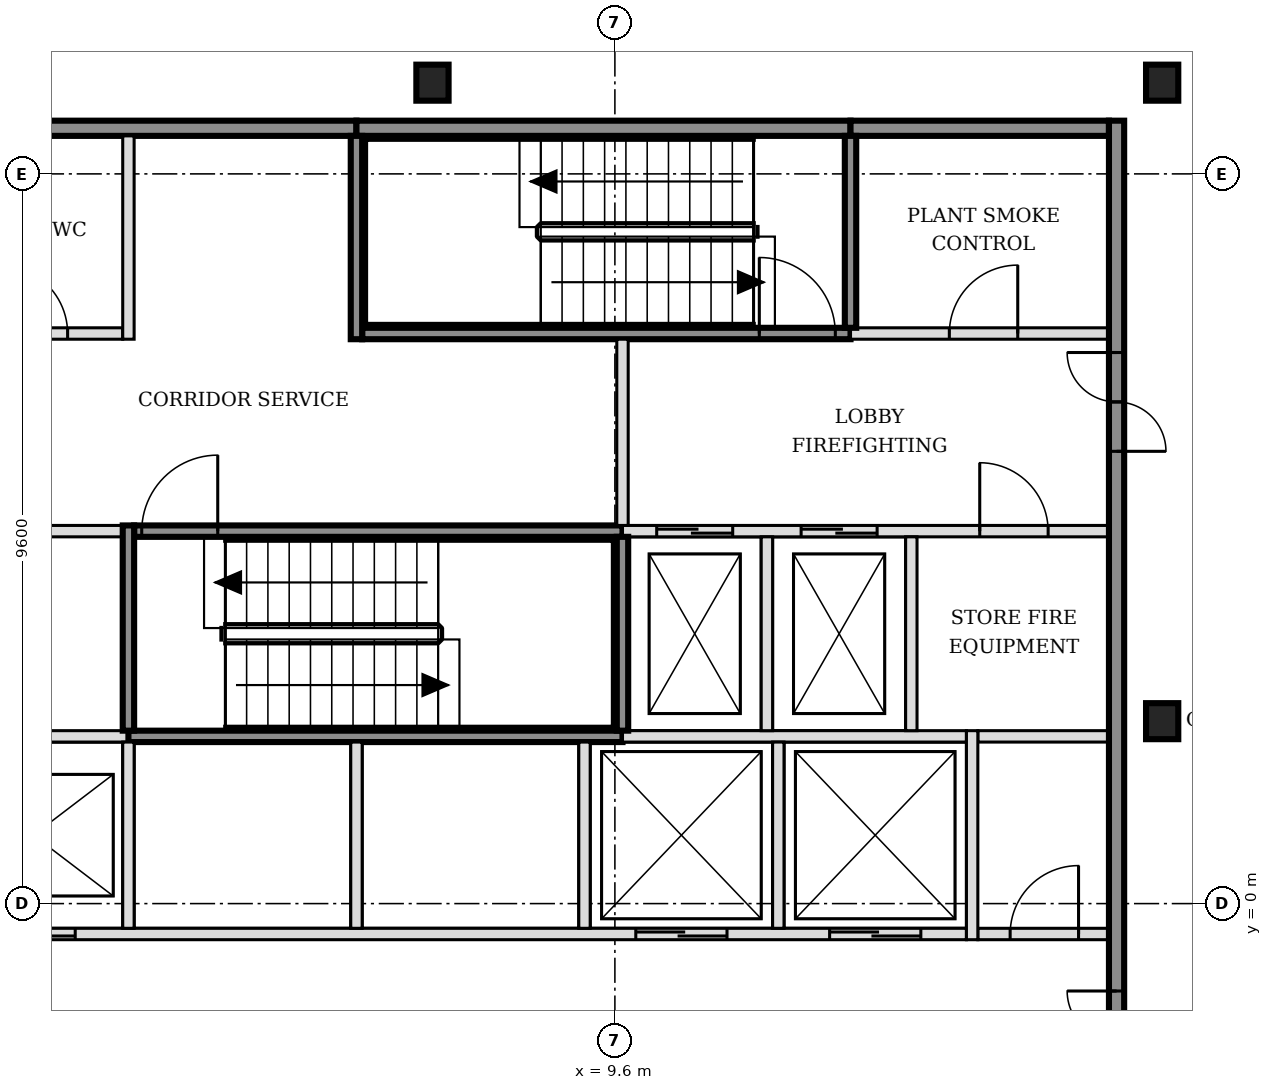
"""IFC4 building model, lengths in metres.
Left out: names, types, materials, properties, quantities, classifications, styles, units other than length and angle.
Written with IfcOpenShell. Run it as: python <this file> out.ifc"""

import sys

from ifc_helpers import new_model, si_unit, direction, frame, frame_2d, origin, origin_2d, place, context, subcontext, project, spatial, rectangle, i_section, extrude, element, fill, save


model = new_model("IFC4")
c1 = context("Model", 3, precision=1e-05, world=origin(), true_north=direction((0.0, 1.0)))
c2 = subcontext(c1, "Body", "Model", "MODEL_VIEW")
j1 = project(units=[si_unit("LENGTHUNIT", "METRE"), si_unit("PLANEANGLEUNIT", "RADIAN")], contexts=[c1])
p1 = place(None, origin())
s1 = spatial("IfcSite", under=j1, at=p1, CompositionType="ELEMENT")
p2 = place(p1, origin())
s2 = spatial("IfcBuilding", under=s1, at=p2, CompositionType="ELEMENT")
p3 = place(p2, frame((0.0, 0.0, 115.8)))
s3 = spatial("IfcBuildingStorey", under=s2, at=p3, CompositionType="ELEMENT", Elevation=115.8)
for number, where, z_axis, x_axis in (
    (1, (16.8, 2.4, -0.15), (0.0, 0.0, 1.0), (1.0, 0.0, 0.0)),
    (2, (7.2, 10.8, -0.15), (0.0, 0.0, 1.0), (1.0, 0.0, 0.0)),
    (3, (16.8, 10.8, -0.15), (0.0, 0.0, 1.0), (1.0, 0.0, 0.0)),
):
    element("IfcColumn", number, at=place(p3, frame(where, z_axis=z_axis, x_axis=x_axis)), inside=s3, PredefinedType="COLUMN", context=c2, shape_type="SweptSolid", body=[
        extrude(i_section(OverallWidth=0.424, OverallDepth=0.474, WebThickness=0.048, FlangeThickness=0.077, FilletRadius=0.015, at=origin_2d()), origin(), (0.0, 0.0, 1.0), 3.5),
    ])
p4 = place(p3, frame((-1.7, -0.4, 0.0), z_axis=(0.0, 0.0, 1.0), x_axis=(1.0, 0.0, 0.0)))
e4 = element("IfcWall", 4, at=p4, inside=s3, PredefinedType="SOLIDWALL", context=c2, shape_type="SweptSolid", body=[
    extrude(rectangle(XDim=15.925, YDim=0.15, at=frame_2d((7.962, 0.0))), origin(), (0.0, 0.0, 1.0), 3.35),
])
p5 = place(p4, frame((0.6, 0.0, 0.0)))
e5 = element("IfcOpeningElement", 5, at=p5, cuts=e4, PredefinedType="OPENING", context=c2, shape_type="SweptSolid", body=[
    extrude(rectangle(XDim=1.1, YDim=2.1, at=frame_2d((0.55, 1.05))), frame((0.0, 0.085, 0.0), z_axis=(0.0, -1.0, 0.0), x_axis=(1.0, 0.0, 0.0)), (0.0, 0.0, 1.0), 0.17),
])
p6 = place(p4, frame((3.1, 0.0, 0.0)))
e6 = element("IfcOpeningElement", 6, at=p6, cuts=e4, PredefinedType="OPENING", context=c2, shape_type="SweptSolid", body=[
    extrude(rectangle(XDim=1.1, YDim=2.1, at=frame_2d((0.55, 1.05))), frame((0.0, 0.085, 0.0), z_axis=(0.0, -1.0, 0.0), x_axis=(1.0, 0.0, 0.0)), (0.0, 0.0, 1.0), 0.17),
])
p7 = place(p4, frame((11.575, 0.0, 0.0)))
e7 = element("IfcOpeningElement", 7, at=p7, cuts=e4, PredefinedType="OPENING", context=c2, shape_type="SweptSolid", body=[
    extrude(rectangle(XDim=1.2, YDim=2.1, at=frame_2d((0.6, 1.05))), frame((0.0, 0.085, 0.0), z_axis=(0.0, -1.0, 0.0), x_axis=(1.0, 0.0, 0.0)), (0.0, 0.0, 1.0), 0.17),
])
p8 = place(p4, frame((14.125, 0.0, 0.0)))
e8 = element("IfcOpeningElement", 8, at=p8, cuts=e4, PredefinedType="OPENING", context=c2, shape_type="SweptSolid", body=[
    extrude(rectangle(XDim=1.2, YDim=2.1, at=frame_2d((0.6, 1.05))), frame((0.0, 0.085, 0.0), z_axis=(0.0, -1.0, 0.0), x_axis=(1.0, 0.0, 0.0)), (0.0, 0.0, 1.0), 0.17),
])
p9 = place(p3, frame((14.375, -0.4, 0.0), z_axis=(0.0, 0.0, 1.0), x_axis=(1.0, 0.0, 0.0)))
e9 = element("IfcWall", 9, at=p9, inside=s3, PredefinedType="PARTITIONING", context=c2, shape_type="SweptSolid", body=[
    extrude(rectangle(XDim=1.725, YDim=0.15, at=frame_2d((0.863, 0.0))), origin(), (0.0, 0.0, 1.0), 3.35),
])
p10 = place(p9, frame((0.425, 0.0, 0.0)))
e10 = element("IfcOpeningElement", 10, at=p10, cuts=e9, PredefinedType="OPENING", context=c2, shape_type="SweptSolid", body=[
    extrude(rectangle(XDim=0.9, YDim=2.1, at=frame_2d((0.45, 1.05))), frame((0.0, 0.085, 0.0), z_axis=(0.0, -1.0, 0.0), x_axis=(1.0, 0.0, 0.0)), (0.0, 0.0, 1.0), 0.17),
])
p11 = place(p3, frame((-1.7, 2.2, 0.0), z_axis=(0.0, 0.0, 1.0), x_axis=(1.0, 0.0, 0.0)))
e11 = element("IfcWall", 11, at=p11, inside=s3, PredefinedType="SOLIDWALL", context=c2, shape_type="SweptSolid", body=[
    extrude(rectangle(XDim=4.9, YDim=0.15, at=frame_2d((2.45, 0.0))), origin(), (0.0, 0.0, 1.0), 3.35),
])
p12 = place(p3, frame((3.2, 2.2, 0.0), z_axis=(0.0, 0.0, 1.0), x_axis=(1.0, 0.0, 0.0)))
e12 = element("IfcWall", 12, at=p12, inside=s3, PredefinedType="SOLIDWALL", context=c2, shape_type="SweptSolid", body=[
    extrude(rectangle(XDim=6.5, YDim=0.15, at=frame_2d((3.25, 0.0))), origin(), (0.0, 0.0, 1.0), 3.35),
])
p13 = place(p3, frame((9.7, 2.2, 0.0), z_axis=(0.0, 0.0, 1.0), x_axis=(1.0, 0.0, 0.0)))
e13 = element("IfcWall", 13, at=p13, inside=s3, PredefinedType="SOLIDWALL", context=c2, shape_type="SweptSolid", body=[
    extrude(rectangle(XDim=4.525, YDim=0.15, at=frame_2d((2.263, 0.0))), origin(), (0.0, 0.0, 1.0), 3.35),
])
p14 = place(p3, frame((14.375, 2.2, 0.0), z_axis=(0.0, 0.0, 1.0), x_axis=(1.0, 0.0, 0.0)))
e14 = element("IfcWall", 14, at=p14, inside=s3, PredefinedType="PARTITIONING", context=c2, shape_type="SweptSolid", body=[
    extrude(rectangle(XDim=1.725, YDim=0.15, at=frame_2d((0.863, 0.0))), origin(), (0.0, 0.0, 1.0), 3.35),
])
p15 = place(p3, frame((-1.7, 4.9, 0.0), z_axis=(0.0, 0.0, 1.0), x_axis=(1.0, 0.0, 0.0)))
e15 = element("IfcWall", 15, at=p15, inside=s3, PredefinedType="PARTITIONING", context=c2, shape_type="SweptSolid", body=[
    extrude(rectangle(XDim=4.825, YDim=0.15, at=frame_2d((2.413, 0.0))), origin(), (0.0, 0.0, 1.0), 3.35),
])
p16 = place(p15, frame((1.95, 0.0, 0.0)))
e16 = element("IfcOpeningElement", 16, at=p16, cuts=e15, PredefinedType="OPENING", context=c2, shape_type="SweptSolid", body=[
    extrude(rectangle(XDim=0.9, YDim=2.1, at=frame_2d((0.45, 1.05))), frame((0.0, 0.085, 0.0), z_axis=(0.0, -1.0, 0.0), x_axis=(1.0, 0.0, 0.0)), (0.0, 0.0, 1.0), 0.17),
])
p17 = place(p3, frame((3.275, 4.9, 0.0), z_axis=(0.0, 0.0, 1.0), x_axis=(1.0, 0.0, 0.0)))
e17 = element("IfcWall", 17, at=p17, inside=s3, PredefinedType="SOLIDWALL", context=c2, shape_type="SweptSolid", body=[
    extrude(rectangle(XDim=6.425, YDim=0.15, at=frame_2d((3.212, 0.0))), origin(), (0.0, 0.0, 1.0), 3.35),
])
p18 = place(p17, frame((0.1, 0.0, 0.0)))
e18 = element("IfcOpeningElement", 18, at=p18, cuts=e17, PredefinedType="OPENING", context=c2, shape_type="SweptSolid", body=[
    extrude(rectangle(XDim=1.0, YDim=2.1, at=frame_2d((0.5, 1.05))), frame((0.0, 0.085, 0.0), z_axis=(0.0, -1.0, 0.0), x_axis=(1.0, 0.0, 0.0)), (0.0, 0.0, 1.0), 0.17),
])
p19 = place(p3, frame((9.7, 4.9, 0.0), z_axis=(0.0, 0.0, 1.0), x_axis=(1.0, 0.0, 0.0)))
e19 = element("IfcWall", 19, at=p19, inside=s3, PredefinedType="SOLIDWALL", context=c2, shape_type="SweptSolid", body=[
    extrude(rectangle(XDim=6.4, YDim=0.15, at=frame_2d((3.2, 0.0))), origin(), (0.0, 0.0, 1.0), 3.35),
])
p20 = place(p19, frame((0.45, 0.0, 0.0)))
e20 = element("IfcOpeningElement", 20, at=p20, cuts=e19, PredefinedType="OPENING", context=c2, shape_type="SweptSolid", body=[
    extrude(rectangle(XDim=1.0, YDim=2.1, at=frame_2d((0.5, 1.05))), frame((0.0, 0.085, 0.0), z_axis=(0.0, -1.0, 0.0), x_axis=(1.0, 0.0, 0.0)), (0.0, 0.0, 1.0), 0.17),
])
p21 = place(p19, frame((2.35, 0.0, 0.0)))
e21 = element("IfcOpeningElement", 21, at=p21, cuts=e19, PredefinedType="OPENING", context=c2, shape_type="SweptSolid", body=[
    extrude(rectangle(XDim=1.0, YDim=2.1, at=frame_2d((0.5, 1.05))), frame((0.0, 0.085, 0.0), z_axis=(0.0, -1.0, 0.0), x_axis=(1.0, 0.0, 0.0)), (0.0, 0.0, 1.0), 0.17),
])
p22 = place(p19, frame((4.7, 0.0, 0.0)))
e22 = element("IfcOpeningElement", 22, at=p22, cuts=e19, PredefinedType="OPENING", context=c2, shape_type="SweptSolid", body=[
    extrude(rectangle(XDim=0.9, YDim=2.1, at=frame_2d((0.45, 1.05))), frame((0.0, 0.085, 0.0), z_axis=(0.0, -1.0, 0.0), x_axis=(1.0, 0.0, 0.0)), (0.0, 0.0, 1.0), 0.17),
])
p23 = place(p3, frame((-1.7, 7.5, 0.0), z_axis=(0.0, 0.0, 1.0), x_axis=(1.0, 0.0, 0.0)))
e23 = element("IfcWall", 23, at=p23, inside=s3, PredefinedType="PARTITIONING", context=c2, shape_type="SweptSolid", body=[
    extrude(rectangle(XDim=4.825, YDim=0.15, at=frame_2d((2.413, 0.0))), origin(), (0.0, 0.0, 1.0), 3.35),
])
p24 = place(p23, frame((0.7, 0.0, 0.0)))
e24 = element("IfcOpeningElement", 24, at=p24, cuts=e23, PredefinedType="OPENING", context=c2, shape_type="SweptSolid", body=[
    extrude(rectangle(XDim=0.9, YDim=2.1, at=frame_2d((0.45, 1.05))), frame((0.0, 0.085, 0.0), z_axis=(0.0, -1.0, 0.0), x_axis=(1.0, 0.0, 0.0)), (0.0, 0.0, 1.0), 0.17),
])
p25 = place(p23, frame((3.2, 0.0, 0.0)))
e25 = element("IfcOpeningElement", 25, at=p25, cuts=e23, PredefinedType="OPENING", context=c2, shape_type="SweptSolid", body=[
    extrude(rectangle(XDim=0.9, YDim=2.1, at=frame_2d((0.45, 1.05))), frame((0.0, 0.085, 0.0), z_axis=(0.0, -1.0, 0.0), x_axis=(1.0, 0.0, 0.0)), (0.0, 0.0, 1.0), 0.17),
])
p26 = place(p3, frame((6.275, 7.5, 0.0), z_axis=(0.0, 0.0, 1.0), x_axis=(1.0, 0.0, 0.0)))
e26 = element("IfcWall", 26, at=p26, inside=s3, PredefinedType="SOLIDWALL", context=c2, shape_type="SweptSolid", body=[
    extrude(rectangle(XDim=6.425, YDim=0.15, at=frame_2d((3.212, 0.0))), origin(), (0.0, 0.0, 1.0), 3.35),
])
p27 = place(p26, frame((5.225, 0.0, 0.0)))
e27 = element("IfcOpeningElement", 27, at=p27, cuts=e26, PredefinedType="OPENING", context=c2, shape_type="SweptSolid", body=[
    extrude(rectangle(XDim=1.0, YDim=2.1, at=frame_2d((0.5, 1.05))), frame((0.0, 0.085, 0.0), z_axis=(0.0, -1.0, 0.0), x_axis=(1.0, 0.0, 0.0)), (0.0, 0.0, 1.0), 0.17),
])
p28 = place(p3, frame((12.7, 7.5, 0.0), z_axis=(0.0, 0.0, 1.0), x_axis=(1.0, 0.0, 0.0)))
e28 = element("IfcWall", 28, at=p28, inside=s3, PredefinedType="SOLIDWALL", context=c2, shape_type="SweptSolid", body=[
    extrude(rectangle(XDim=3.4, YDim=0.15, at=frame_2d((1.7, 0.0))), origin(), (0.0, 0.0, 1.0), 3.35),
])
p29 = place(p28, frame((1.3, 0.0, 0.0)))
e29 = element("IfcOpeningElement", 29, at=p29, cuts=e28, PredefinedType="OPENING", context=c2, shape_type="SweptSolid", body=[
    extrude(rectangle(XDim=0.9, YDim=2.1, at=frame_2d((0.45, 1.05))), frame((0.0, 0.085, 0.0), z_axis=(0.0, -1.0, 0.0), x_axis=(1.0, 0.0, 0.0)), (0.0, 0.0, 1.0), 0.17),
])
p30 = place(p3, frame((-1.7, 10.2, 0.0), z_axis=(0.0, 0.0, 1.0), x_axis=(1.0, 0.0, 0.0)))
e30 = element("IfcWall", 30, at=p30, inside=s3, PredefinedType="SOLIDWALL", context=c2, shape_type="SweptSolid", body=[
    extrude(rectangle(XDim=7.9, YDim=0.2, at=frame_2d((3.95, 0.0))), origin(), (0.0, 0.0, 1.0), 3.35),
])
p31 = place(p3, frame((6.2, 10.2, 0.0), z_axis=(0.0, 0.0, 1.0), x_axis=(1.0, 0.0, 0.0)))
e31 = element("IfcWall", 31, at=p31, inside=s3, PredefinedType="SOLIDWALL", context=c2, shape_type="SweptSolid", body=[
    extrude(rectangle(XDim=6.5, YDim=0.2, at=frame_2d((3.25, 0.0))), origin(), (0.0, 0.0, 1.0), 3.35),
])
p32 = place(p3, frame((12.7, 10.2, 0.0), z_axis=(0.0, 0.0, 1.0), x_axis=(1.0, 0.0, 0.0)))
e32 = element("IfcWall", 32, at=p32, inside=s3, PredefinedType="SOLIDWALL", context=c2, shape_type="SweptSolid", body=[
    extrude(rectangle(XDim=3.4, YDim=0.2, at=frame_2d((1.7, 0.0))), origin(), (0.0, 0.0, 1.0), 3.35),
])
p33 = place(p3, frame((3.2, -0.325, 0.0), z_axis=(0.0, 0.0, 1.0), x_axis=(0.0, 1.0, 0.0)))
e33 = element("IfcWall", 33, at=p33, inside=s3, PredefinedType="SOLIDWALL", context=c2, shape_type="SweptSolid", body=[
    extrude(rectangle(XDim=2.45, YDim=0.15, at=frame_2d((1.225, 0.0))), origin(), (0.0, 0.0, 1.0), 3.35),
])
p34 = place(p3, frame((3.2, 2.275, 0.0), z_axis=(0.0, 0.0, 1.0), x_axis=(0.0, 1.0, 0.0)))
e34 = element("IfcWall", 34, at=p34, inside=s3, PredefinedType="SOLIDWALL", context=c2, shape_type="SweptSolid", body=[
    extrude(rectangle(XDim=2.7, YDim=0.15, at=frame_2d((1.35, 0.0))), origin(), (0.0, 0.0, 1.0), 3.35),
])
p35 = place(p3, frame((3.2, 7.425, 0.0), z_axis=(0.0, 0.0, 1.0), x_axis=(0.0, 1.0, 0.0)))
e35 = element("IfcWall", 35, at=p35, inside=s3, PredefinedType="PARTITIONING", context=c2, shape_type="SweptSolid", body=[
    extrude(rectangle(XDim=2.675, YDim=0.15, at=frame_2d((1.337, 0.0))), origin(), (0.0, 0.0, 1.0), 3.35),
])
p36 = place(p3, frame((6.2, -0.325, 0.0), z_axis=(0.0, 0.0, 1.0), x_axis=(0.0, 1.0, 0.0)))
e36 = element("IfcWall", 36, at=p36, inside=s3, PredefinedType="SOLIDWALL", context=c2, shape_type="SweptSolid", body=[
    extrude(rectangle(XDim=2.45, YDim=0.15, at=frame_2d((1.225, 0.0))), origin(), (0.0, 0.0, 1.0), 3.35),
])
p37 = place(p3, frame((6.2, 7.425, 0.0), z_axis=(0.0, 0.0, 1.0), x_axis=(0.0, 1.0, 0.0)))
e37 = element("IfcWall", 37, at=p37, inside=s3, PredefinedType="SOLIDWALL", context=c2, shape_type="SweptSolid", body=[
    extrude(rectangle(XDim=2.675, YDim=0.15, at=frame_2d((1.337, 0.0))), origin(), (0.0, 0.0, 1.0), 3.35),
])
p38 = place(p3, frame((9.2, -0.325, 0.0), z_axis=(0.0, 0.0, 1.0), x_axis=(0.0, 1.0, 0.0)))
e38 = element("IfcWall", 38, at=p38, inside=s3, PredefinedType="SOLIDWALL", context=c2, shape_type="SweptSolid", body=[
    extrude(rectangle(XDim=2.45, YDim=0.15, at=frame_2d((1.225, 0.0))), origin(), (0.0, 0.0, 1.0), 3.35),
])
p39 = place(p3, frame((9.7, 2.275, 0.0), z_axis=(0.0, 0.0, 1.0), x_axis=(0.0, 1.0, 0.0)))
e39 = element("IfcWall", 39, at=p39, inside=s3, PredefinedType="SOLIDWALL", context=c2, shape_type="SweptSolid", body=[
    extrude(rectangle(XDim=2.55, YDim=0.15, at=frame_2d((1.275, 0.0))), origin(), (0.0, 0.0, 1.0), 3.35),
])
p40 = place(p3, frame((9.7, 4.975, 0.0), z_axis=(0.0, 0.0, 1.0), x_axis=(0.0, 1.0, 0.0)))
e40 = element("IfcWall", 40, at=p40, inside=s3, PredefinedType="SOLIDWALL", context=c2, shape_type="SweptSolid", body=[
    extrude(rectangle(XDim=2.45, YDim=0.15, at=frame_2d((1.225, 0.0))), origin(), (0.0, 0.0, 1.0), 3.35),
])
p41 = place(p3, frame((11.6, 2.275, 0.0), z_axis=(0.0, 0.0, 1.0), x_axis=(0.0, 1.0, 0.0)))
e41 = element("IfcWall", 41, at=p41, inside=s3, PredefinedType="SOLIDWALL", context=c2, shape_type="SweptSolid", body=[
    extrude(rectangle(XDim=2.55, YDim=0.15, at=frame_2d((1.275, 0.0))), origin(), (0.0, 0.0, 1.0), 3.35),
])
p42 = place(p3, frame((11.75, -0.325, 0.0), z_axis=(0.0, 0.0, 1.0), x_axis=(0.0, 1.0, 0.0)))
e42 = element("IfcWall", 42, at=p42, inside=s3, PredefinedType="SOLIDWALL", context=c2, shape_type="SweptSolid", body=[
    extrude(rectangle(XDim=2.45, YDim=0.15, at=frame_2d((1.225, 0.0))), origin(), (0.0, 0.0, 1.0), 3.35),
])
p43 = place(p3, frame((12.7, 7.575, 0.0), z_axis=(0.0, 0.0, 1.0), x_axis=(0.0, 1.0, 0.0)))
e43 = element("IfcWall", 43, at=p43, inside=s3, PredefinedType="SOLIDWALL", context=c2, shape_type="SweptSolid", body=[
    extrude(rectangle(XDim=2.525, YDim=0.15, at=frame_2d((1.263, 0.0))), origin(), (0.0, 0.0, 1.0), 3.35),
])
p44 = place(p3, frame((13.5, 2.275, 0.0), z_axis=(0.0, 0.0, 1.0), x_axis=(0.0, 1.0, 0.0)))
e44 = element("IfcWall", 44, at=p44, inside=s3, PredefinedType="SOLIDWALL", context=c2, shape_type="SweptSolid", body=[
    extrude(rectangle(XDim=2.55, YDim=0.15, at=frame_2d((1.275, 0.0))), origin(), (0.0, 0.0, 1.0), 3.35),
])
p45 = place(p3, frame((14.3, -0.475, 0.0), z_axis=(0.0, 0.0, 1.0), x_axis=(0.0, 1.0, 0.0)))
e45 = element("IfcWall", 45, at=p45, inside=s3, PredefinedType="SOLIDWALL", context=c2, shape_type="SweptSolid", body=[
    extrude(rectangle(XDim=2.75, YDim=0.15, at=frame_2d((1.375, 0.0))), origin(), (0.0, 0.0, 1.0), 3.35),
])
p46 = place(p3, frame((16.2, -5.5, 0.0), z_axis=(0.0, 0.0, 1.0), x_axis=(0.0, 1.0, 0.0)))
e46 = element("IfcWall", 46, at=p46, inside=s3, PredefinedType="SOLIDWALL", context=c2, shape_type="SweptSolid", body=[
    extrude(rectangle(XDim=15.8, YDim=0.2, at=frame_2d((7.9, 0.0))), origin(), (0.0, 0.0, 1.0), 3.35),
])
p47 = place(p46, frame((3.05, 0.0, 0.0)))
e47 = element("IfcOpeningElement", 47, at=p47, cuts=e46, PredefinedType="OPENING", context=c2, shape_type="SweptSolid", body=[
    extrude(rectangle(XDim=1.3, YDim=2.1, at=frame_2d((0.65, 1.05))), frame((0.0, 0.11, 0.0), z_axis=(0.0, -1.0, 0.0), x_axis=(1.0, 0.0, 0.0)), (0.0, 0.0, 1.0), 0.22),
])
p48 = place(p46, frame((11.45, 0.0, 0.0)))
e48 = element("IfcOpeningElement", 48, at=p48, cuts=e46, PredefinedType="OPENING", context=c2, shape_type="SweptSolid", body=[
    extrude(rectangle(XDim=1.3, YDim=2.1, at=frame_2d((0.65, 1.05))), frame((0.0, 0.11, 0.0), z_axis=(0.0, -1.0, 0.0), x_axis=(1.0, 0.0, 0.0)), (0.0, 0.0, 1.0), 0.22),
])
p49 = place(p6, origin())
e49 = element("IfcDoor", 49, at=p49, inside=s3, OperationType="DOUBLE_DOOR_SLIDING", PredefinedType="DOOR", context=c2, shape_type="SweptSolid", body=[
    extrude(rectangle(XDim=1.1, YDim=2.1, at=frame_2d((0.55, 1.05))), frame((0.0, 0.025, 0.0), z_axis=(0.0, -1.0, 0.0), x_axis=(1.0, 0.0, 0.0)), (0.0, 0.0, 1.0), 0.05),
])
fill(e6, e49)
p50 = place(p7, origin())
e50 = element("IfcDoor", 50, at=p50, inside=s3, OperationType="DOUBLE_DOOR_SLIDING", PredefinedType="DOOR", context=c2, shape_type="SweptSolid", body=[
    extrude(rectangle(XDim=1.2, YDim=2.1, at=frame_2d((0.6, 1.05))), frame((0.0, 0.025, 0.0), z_axis=(0.0, -1.0, 0.0), x_axis=(1.0, 0.0, 0.0)), (0.0, 0.0, 1.0), 0.05),
])
fill(e7, e50)
p51 = place(p8, origin())
e51 = element("IfcDoor", 51, at=p51, inside=s3, OperationType="DOUBLE_DOOR_SLIDING", PredefinedType="DOOR", context=c2, shape_type="SweptSolid", body=[
    extrude(rectangle(XDim=1.2, YDim=2.1, at=frame_2d((0.6, 1.05))), frame((0.0, 0.025, 0.0), z_axis=(0.0, -1.0, 0.0), x_axis=(1.0, 0.0, 0.0)), (0.0, 0.0, 1.0), 0.05),
])
fill(e8, e51)
p52 = place(p20, origin())
e52 = element("IfcDoor", 52, at=p52, inside=s3, OperationType="DOUBLE_DOOR_SLIDING", PredefinedType="DOOR", context=c2, shape_type="SweptSolid", body=[
    extrude(rectangle(XDim=1.0, YDim=2.1, at=frame_2d((0.5, 1.05))), frame((0.0, 0.025, 0.0), z_axis=(0.0, -1.0, 0.0), x_axis=(1.0, 0.0, 0.0)), (0.0, 0.0, 1.0), 0.05),
])
fill(e20, e52)
p53 = place(p21, origin())
e53 = element("IfcDoor", 53, at=p53, inside=s3, OperationType="DOUBLE_DOOR_SLIDING", PredefinedType="DOOR", context=c2, shape_type="SweptSolid", body=[
    extrude(rectangle(XDim=1.0, YDim=2.1, at=frame_2d((0.5, 1.05))), frame((0.0, 0.025, 0.0), z_axis=(0.0, -1.0, 0.0), x_axis=(1.0, 0.0, 0.0)), (0.0, 0.0, 1.0), 0.05),
])
fill(e21, e53)
p54 = place(p18, origin())
e54 = element("IfcDoor", 54, at=p54, inside=s3, OperationType="SINGLE_SWING_RIGHT", PredefinedType="DOOR", context=c2, shape_type="SweptSolid", body=[
    extrude(rectangle(XDim=1.0, YDim=2.1, at=frame_2d((0.5, 1.05))), frame((0.0, 0.025, 0.0), z_axis=(0.0, -1.0, 0.0), x_axis=(1.0, 0.0, 0.0)), (0.0, 0.0, 1.0), 0.05),
])
fill(e18, e54)
p55 = place(p27, origin())
e55 = element("IfcDoor", 55, at=p55, inside=s3, OperationType="SINGLE_SWING_LEFT", PredefinedType="DOOR", context=c2, shape_type="SweptSolid", body=[
    extrude(rectangle(XDim=1.0, YDim=2.1, at=frame_2d((0.5, 1.05))), frame((0.0, 0.025, 0.0), z_axis=(0.0, -1.0, 0.0), x_axis=(1.0, 0.0, 0.0)), (0.0, 0.0, 1.0), 0.05),
])
fill(e27, e55)
p56 = place(p47, origin())
e56 = element("IfcDoor", 56, at=p56, inside=s3, OperationType="DOUBLE_DOOR_SINGLE_SWING", PredefinedType="DOOR", context=c2, shape_type="SweptSolid", body=[
    extrude(rectangle(XDim=1.3, YDim=2.1, at=frame_2d((0.65, 1.05))), frame((0.0, 0.025, 0.0), z_axis=(0.0, -1.0, 0.0), x_axis=(1.0, 0.0, 0.0)), (0.0, 0.0, 1.0), 0.05),
])
fill(e47, e56)
p57 = place(p48, origin())
e57 = element("IfcDoor", 57, at=p57, inside=s3, OperationType="DOUBLE_DOOR_SINGLE_SWING", PredefinedType="DOOR", context=c2, shape_type="SweptSolid", body=[
    extrude(rectangle(XDim=1.3, YDim=2.1, at=frame_2d((0.65, 1.05))), frame((0.0, 0.025, 0.0), z_axis=(0.0, -1.0, 0.0), x_axis=(1.0, 0.0, 0.0)), (0.0, 0.0, 1.0), 0.05),
])
fill(e48, e57)
p58 = place(p10, origin())
e58 = element("IfcDoor", 58, at=p58, inside=s3, OperationType="SINGLE_SWING_RIGHT", PredefinedType="DOOR", context=c2, shape_type="SweptSolid", body=[
    extrude(rectangle(XDim=0.9, YDim=2.1, at=frame_2d((0.45, 1.05))), frame((0.0, 0.025, 0.0), z_axis=(0.0, -1.0, 0.0), x_axis=(1.0, 0.0, 0.0)), (0.0, 0.0, 1.0), 0.05),
])
fill(e10, e58)
p59 = place(p22, origin())
e59 = element("IfcDoor", 59, at=p59, inside=s3, OperationType="SINGLE_SWING_LEFT", PredefinedType="DOOR", context=c2, shape_type="SweptSolid", body=[
    extrude(rectangle(XDim=0.9, YDim=2.1, at=frame_2d((0.45, 1.05))), frame((0.0, 0.025, 0.0), z_axis=(0.0, -1.0, 0.0), x_axis=(1.0, 0.0, 0.0)), (0.0, 0.0, 1.0), 0.05),
])
fill(e22, e59)
p60 = place(p29, origin())
e60 = element("IfcDoor", 60, at=p60, inside=s3, OperationType="SINGLE_SWING_RIGHT", PredefinedType="DOOR", context=c2, shape_type="SweptSolid", body=[
    extrude(rectangle(XDim=0.9, YDim=2.1, at=frame_2d((0.45, 1.05))), frame((0.0, 0.025, 0.0), z_axis=(0.0, -1.0, 0.0), x_axis=(1.0, 0.0, 0.0)), (0.0, 0.0, 1.0), 0.05),
])
fill(e29, e60)
p61 = place(p25, origin())
e61 = element("IfcDoor", 61, at=p61, inside=s3, OperationType="SINGLE_SWING_LEFT", PredefinedType="DOOR", context=c2, shape_type="SweptSolid", body=[
    extrude(rectangle(XDim=0.9, YDim=2.1, at=frame_2d((0.45, 1.05))), frame((0.0, 0.025, 0.0), z_axis=(0.0, -1.0, 0.0), x_axis=(1.0, 0.0, 0.0)), (0.0, 0.0, 1.0), 0.05),
])
fill(e25, e61)
save(model, sys.argv[1])
